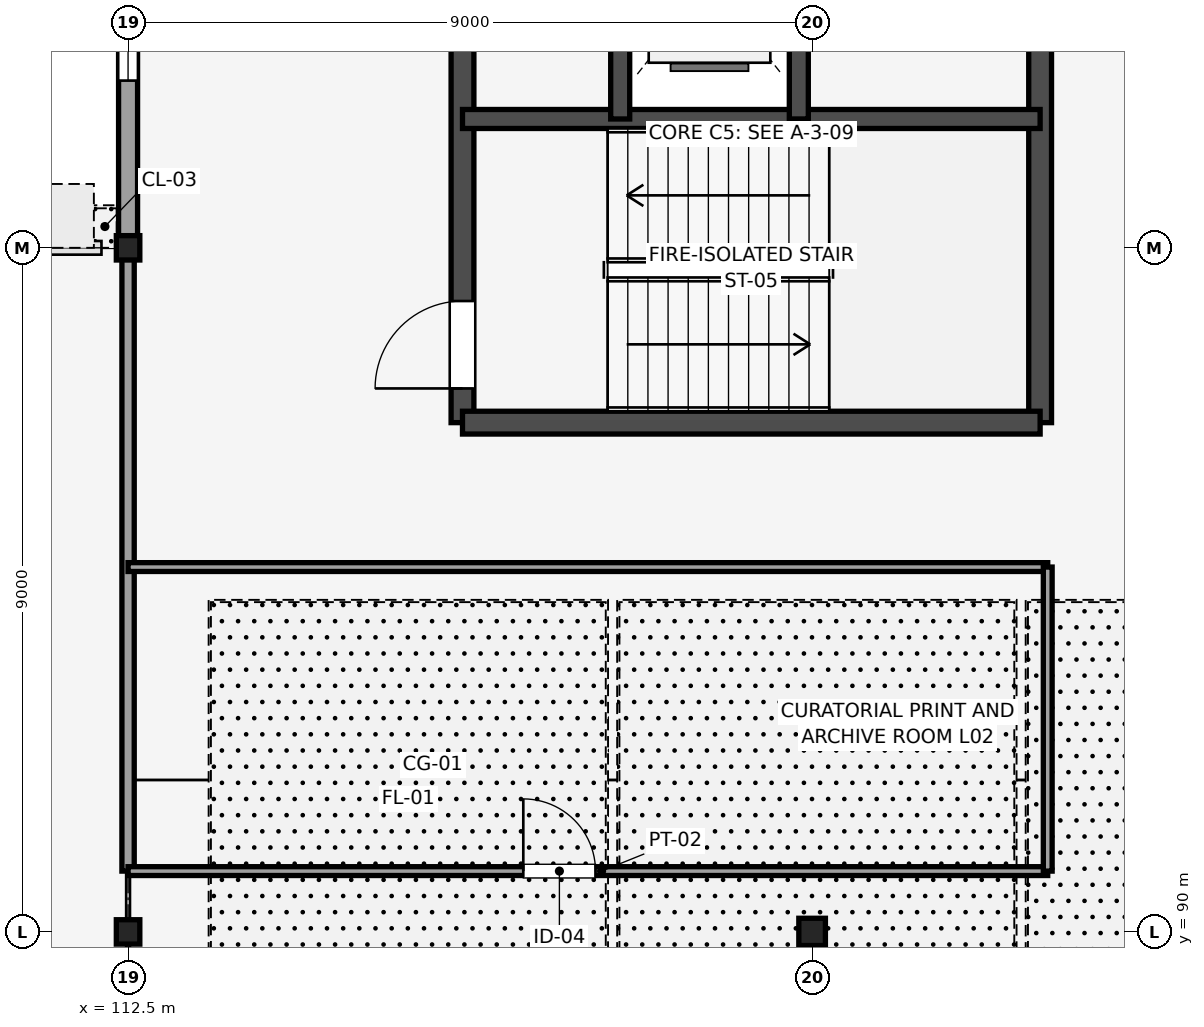
"""IFC4 building model, lengths in metres.
Left out: names, types, materials, properties, quantities, classifications, styles, units other than length and angle.
Written with IfcOpenShell. Run it as: python <this file> out.ifc"""

import sys

from ifc_helpers import new_model, si_unit, direction, frame, frame_2d, origin, origin_2d, place, context, subcontext, project, spatial, rectangle, i_section, extrude, element, fill, save


model = new_model("IFC4")
c1 = context("Model", 3, precision=1e-05, world=origin(), true_north=direction((0.0, 1.0)))
c2 = subcontext(c1, "Body", "Model", "MODEL_VIEW")
j1 = project(units=[si_unit("LENGTHUNIT", "METRE"), si_unit("PLANEANGLEUNIT", "RADIAN")], contexts=[c1])
p1 = place(None, origin())
s1 = spatial("IfcSite", under=j1, at=p1, CompositionType="ELEMENT")
p2 = place(p1, origin())
s2 = spatial("IfcBuilding", under=s1, at=p2, CompositionType="ELEMENT")
p3 = place(p2, frame((0.0, 0.0, 9.9)))
s3 = spatial("IfcBuildingStorey", under=s2, at=p3, CompositionType="ELEMENT", Elevation=9.9)
for number, where, z_axis, x_axis in (
    (1, (112.5, 90.0, 0.0), (0.0, 0.0, 1.0), (1.0, 0.0, 0.0)),
    (2, (112.5, 99.0, 0.0), (0.0, 0.0, 1.0), (1.0, 0.0, 0.0)),
):
    element("IfcColumn", number, at=place(p3, frame(where, z_axis=z_axis, x_axis=x_axis)), inside=s3, PredefinedType="COLUMN", context=c2, shape_type="SweptSolid", body=[
        extrude(i_section(OverallWidth=0.309, OverallDepth=0.321, WebThickness=0.014, FlangeThickness=0.022, FilletRadius=0.017, at=origin_2d()), origin(), (0.0, 0.0, 1.0), 4.5),
    ])
p4 = place(p3, frame((121.5, 90.0, 0.0), z_axis=(0.0, 0.0, 1.0), x_axis=(1.0, 0.0, 0.0)))
e3 = element("IfcColumn", 3, at=p4, inside=s3, PredefinedType="COLUMN", context=c2, shape_type="SweptSolid", body=[
    extrude(i_section(OverallWidth=0.35, OverallDepth=0.359, WebThickness=0.016, FlangeThickness=0.024, FilletRadius=0.014, at=origin_2d()), origin(), (0.0, 0.0, 1.0), 4.5),
])
p5 = place(p3, frame((116.9, 96.7, 0.0), z_axis=(0.0, 0.0, 1.0), x_axis=(0.0, 1.0, 0.0)))
e4 = element("IfcWall", 4, at=p5, inside=s3, PredefinedType="SHEAR", context=c2, shape_type="SweptSolid", body=[
    extrude(rectangle(XDim=7.6, YDim=0.3, at=frame_2d((3.8, 0.0))), origin(), (0.0, 0.0, 1.0), 4.5),
])
p6 = place(p5, frame((0.45, 0.0, 0.0)))
e5 = element("IfcOpeningElement", 5, at=p6, cuts=e4, PredefinedType="OPENING", context=c2, shape_type="SweptSolid", body=[
    extrude(rectangle(XDim=1.15, YDim=2.15, at=frame_2d((0.575, 1.075))), frame((0.0, 0.16, 0.0), z_axis=(0.0, -1.0, 0.0), x_axis=(1.0, 0.0, 0.0)), (0.0, 0.0, 1.0), 0.32),
])
for number, where, z_axis, x_axis in (
    (6, (124.5, 96.7, 0.0), (0.0, 0.0, 1.0), (0.0, 1.0, 0.0)),
    (7, (116.9, 96.7, 0.0), (0.0, 0.0, 1.0), (1.0, 0.0, 0.0)),
):
    element("IfcWall", number, at=place(p3, frame(where, z_axis=z_axis, x_axis=x_axis)), inside=s3, PredefinedType="SHEAR", context=c2, shape_type="SweptSolid", body=[
        extrude(rectangle(XDim=7.6, YDim=0.3, at=frame_2d((3.8, 0.0))), origin(), (0.0, 0.0, 1.0), 4.5),
    ])
p7 = place(p3, frame((116.9, 100.695, 0.0), z_axis=(0.0, 0.0, 1.0), x_axis=(1.0, 0.0, 0.0)))
e8 = element("IfcWall", 8, at=p7, inside=s3, PredefinedType="SHEAR", context=c2, shape_type="SweptSolid", body=[
    extrude(rectangle(XDim=7.6, YDim=0.25, at=frame_2d((3.8, 0.0))), origin(), (0.0, 0.0, 1.0), 4.5),
])
for number, where, z_axis, x_axis in (
    (9, (118.975, 100.695, 0.0), (0.0, 0.0, 1.0), (0.0, 1.0, 0.0)),
    (10, (121.325, 100.695, 0.0), (0.0, 0.0, 1.0), (0.0, 1.0, 0.0)),
):
    element("IfcWall", number, at=place(p3, frame(where, z_axis=z_axis, x_axis=x_axis)), inside=s3, PredefinedType="SHEAR", context=c2, shape_type="SweptSolid", body=[
        extrude(rectangle(XDim=3.605, YDim=0.25, at=frame_2d((1.802, 0.0))), origin(), (0.0, 0.0, 1.0), 4.5),
    ])
p8 = place(p3, frame((112.5, 111.6, 0.0), z_axis=(0.0, 0.0, 1.0), x_axis=(0.0, -1.0, 0.0)))
e11 = element("IfcWall", 11, at=p8, inside=s3, PredefinedType="STANDARD", context=c2, shape_type="SweptSolid", body=[
    extrude(rectangle(XDim=12.6, YDim=0.25, at=frame_2d((6.3, 0.0))), origin(), (0.0, 0.0, 1.0), 3.846),
])
p9 = place(p8, frame((0.65, 0.0, 1.0)))
e12 = element("IfcOpeningElement", 12, at=p9, cuts=e11, PredefinedType="OPENING", context=c2, shape_type="SweptSolid", body=[
    extrude(rectangle(XDim=1.5, YDim=1.5, at=frame_2d((0.75, 0.75))), frame((0.0, 0.135, 0.0), z_axis=(0.0, -1.0, 0.0), x_axis=(1.0, 0.0, 0.0)), (0.0, 0.0, 1.0), 0.27),
])
p10 = place(p8, frame((8.9, 0.0, 1.0)))
e13 = element("IfcOpeningElement", 13, at=p10, cuts=e11, PredefinedType="OPENING", context=c2, shape_type="SweptSolid", body=[
    extrude(rectangle(XDim=1.5, YDim=1.5, at=frame_2d((0.75, 0.75))), frame((0.0, 0.135, 0.0), z_axis=(0.0, -1.0, 0.0), x_axis=(1.0, 0.0, 0.0)), (0.0, 0.0, 1.0), 0.27),
])
p11 = place(p8, frame((4.6, 0.0, 1.0)))
e14 = element("IfcOpeningElement", 14, at=p11, cuts=e11, PredefinedType="OPENING", context=c2, shape_type="SweptSolid", body=[
    extrude(rectangle(XDim=1.65, YDim=1.55, at=frame_2d((0.825, 0.775))), frame((0.0, 0.135, 0.0), z_axis=(0.0, -1.0, 0.0), x_axis=(1.0, 0.0, 0.0)), (0.0, 0.0, 1.0), 0.27),
])
p12 = place(p3, frame((112.5, 90.8, 0.0), z_axis=(0.0, 0.0, 1.0), x_axis=(0.0, 1.0, 0.0)))
e15 = element("IfcWall", 15, at=p12, inside=s3, PredefinedType="PARTITIONING", context=c2, shape_type="SweptSolid", body=[
    extrude(rectangle(XDim=8.2, YDim=0.162, at=frame_2d((4.1, 0.0))), origin(), (0.0, 0.0, 1.0), 3.846),
])
p13 = place(p3, frame((112.5, 90.8, 0.0), z_axis=(0.0, 0.0, 1.0), x_axis=(1.0, 0.0, 0.0)))
e16 = element("IfcWall", 16, at=p13, inside=s3, PredefinedType="PARTITIONING", context=c2, shape_type="SweptSolid", body=[
    extrude(rectangle(XDim=12.1, YDim=0.116, at=frame_2d((6.05, 0.0))), origin(), (0.0, 0.0, 1.0), 4.32),
])
p14 = place(p13, frame((5.2, 0.0, 0.0)))
e17 = element("IfcOpeningElement", 17, at=p14, cuts=e16, PredefinedType="OPENING", context=c2, shape_type="SweptSolid", body=[
    extrude(rectangle(XDim=0.95, YDim=2.15, at=frame_2d((0.475, 1.075))), frame((0.0, 0.068, 0.0), z_axis=(0.0, -1.0, 0.0), x_axis=(1.0, 0.0, 0.0)), (0.0, 0.0, 1.0), 0.136),
])
p15 = place(p3, frame((112.5, 94.8, 0.0), z_axis=(0.0, 0.0, 1.0), x_axis=(1.0, 0.0, 0.0)))
e18 = element("IfcWall", 18, at=p15, inside=s3, PredefinedType="PARTITIONING", context=c2, shape_type="SweptSolid", body=[
    extrude(rectangle(XDim=12.1, YDim=0.116, at=frame_2d((6.05, 0.0))), origin(), (0.0, 0.0, 1.0), 4.32),
])
p16 = place(p3, frame((124.6, 90.8, 0.0), z_axis=(0.0, 0.0, 1.0), x_axis=(0.0, 1.0, 0.0)))
e19 = element("IfcWall", 19, at=p16, inside=s3, PredefinedType="PARTITIONING", context=c2, shape_type="SweptSolid", body=[
    extrude(rectangle(XDim=4.0, YDim=0.116, at=frame_2d((2.0, 0.0))), origin(), (0.0, 0.0, 1.0), 4.32),
])
p17 = place(p10, origin())
e20 = element("IfcWindow", 20, at=p17, inside=s3, PartitioningType="SINGLE_PANEL", PredefinedType="WINDOW", context=c2, shape_type="SweptSolid", body=[
    extrude(rectangle(XDim=1.5, YDim=1.5, at=frame_2d((0.75, 0.75))), frame((0.0, 0.03, 0.0), z_axis=(0.0, -1.0, 0.0), x_axis=(1.0, 0.0, 0.0)), (0.0, 0.0, 1.0), 0.06),
])
fill(e13, e20)
p18 = place(p6, origin())
e21 = element("IfcDoor", 21, at=p18, inside=s3, OperationType="SINGLE_SWING_LEFT", PredefinedType="DOOR", context=c2, shape_type="SweptSolid", body=[
    extrude(rectangle(XDim=1.15, YDim=2.15, at=frame_2d((0.575, 1.075))), frame((0.0, 0.025, 0.0), z_axis=(0.0, -1.0, 0.0), x_axis=(1.0, 0.0, 0.0)), (0.0, 0.0, 1.0), 0.05),
])
fill(e5, e21)
p19 = place(p14, origin())
e22 = element("IfcDoor", 22, at=p19, inside=s3, OperationType="SINGLE_SWING_LEFT", PredefinedType="DOOR", context=c2, shape_type="SweptSolid", body=[
    extrude(rectangle(XDim=0.95, YDim=2.15, at=frame_2d((0.475, 1.075))), frame((0.0, 0.025, 0.0), z_axis=(0.0, -1.0, 0.0), x_axis=(1.0, 0.0, 0.0)), (0.0, 0.0, 1.0), 0.05),
])
fill(e17, e22)
save(model, sys.argv[1])
